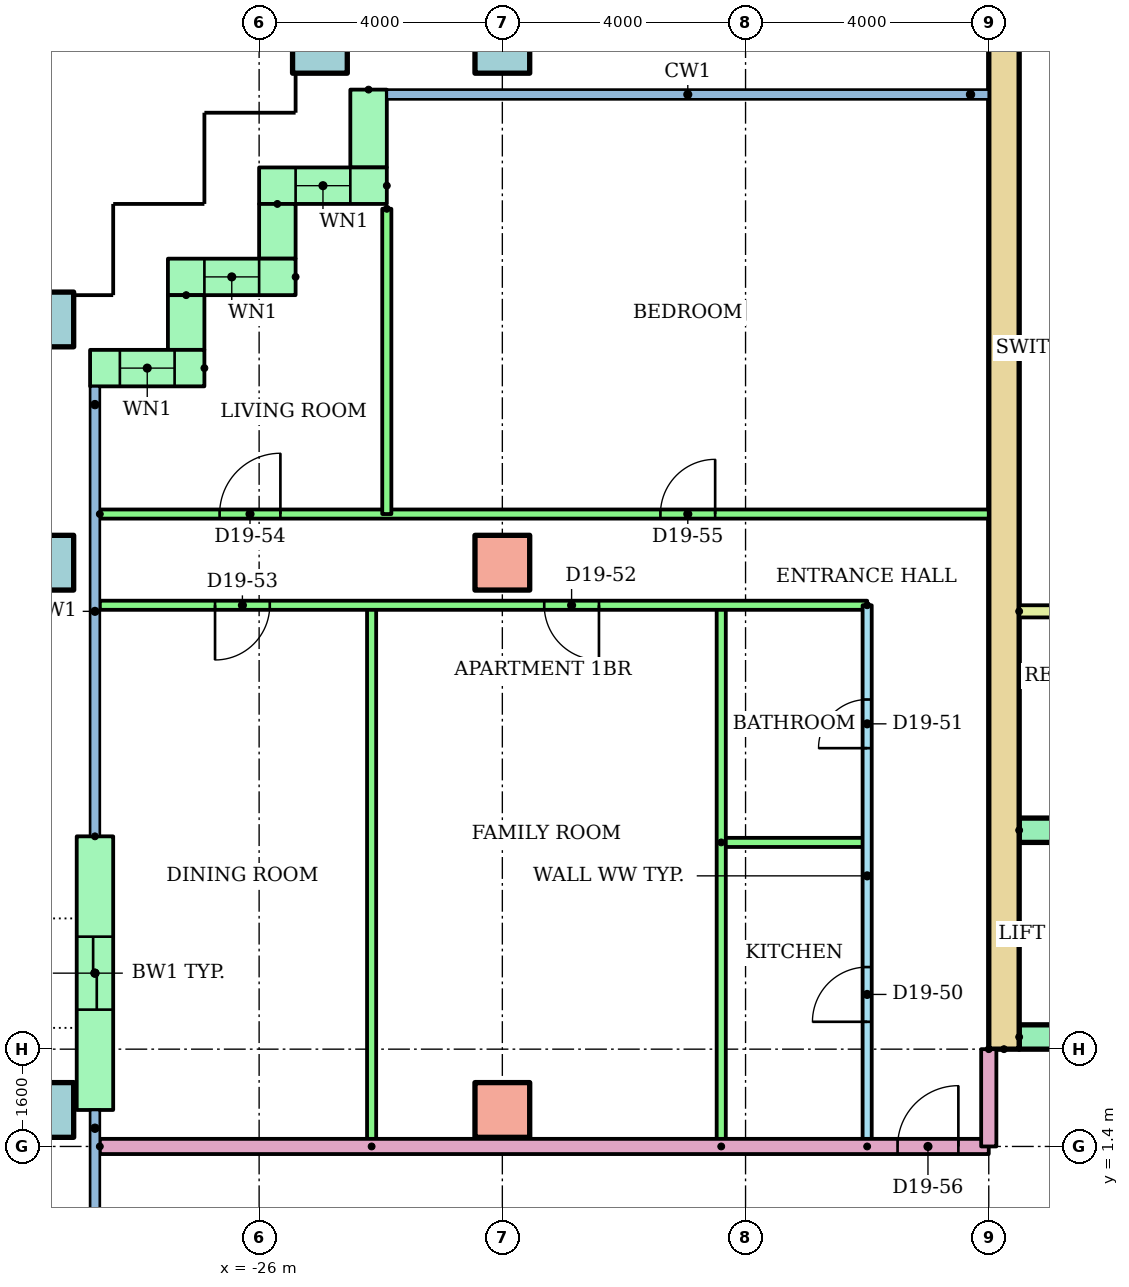
"""IFC4 building model, lengths in metres.
Left out: names, types, materials, properties, quantities, classifications, styles, units other than length and angle.
Written with IfcOpenShell. Run it as: python <this file> out.ifc"""

import sys

from ifc_helpers import new_model, si_unit, direction, frame, frame_2d, origin, origin_2d, place, context, subcontext, project, spatial, rectangle, hollow_rectangle, extrude, element, fill, save


model = new_model("IFC4")
c1 = context("Model", 3, precision=1e-05, world=origin(), true_north=direction((0.0, 1.0)))
c2 = subcontext(c1, "Body", "Model", "MODEL_VIEW")
j1 = project(units=[si_unit("LENGTHUNIT", "METRE"), si_unit("PLANEANGLEUNIT", "RADIAN")], contexts=[c1])
p1 = place(None, origin())
s1 = spatial("IfcSite", under=j1, at=p1, CompositionType="ELEMENT")
p2 = place(p1, origin())
s2 = spatial("IfcBuilding", under=s1, at=p2, CompositionType="ELEMENT")
p3 = place(p2, frame((0.0, 0.0, 77.5)))
s3 = spatial("IfcBuildingStorey", under=s2, at=p3, CompositionType="ELEMENT", Elevation=77.5)
p4 = place(p3, frame((-29.5, 2.0, 0.0)))
e1 = element("IfcColumn", 1, at=p4, inside=s3, PredefinedType="COLUMN", context=c2, shape_type="SweptSolid", body=[
    extrude(hollow_rectangle(XDim=0.9, YDim=0.9, WallThickness=0.045, at=origin_2d()), origin(), (0.0, 0.0, 1.0), 3.2),
])
p5 = place(p3, frame((-22.0, 2.0, 0.0)))
e2 = element("IfcColumn", 2, at=p5, inside=s3, PredefinedType="COLUMN", context=c2, shape_type="SweptSolid", body=[
    extrude(rectangle(XDim=0.9, YDim=0.9, at=origin_2d()), origin(), (0.0, 0.0, 1.0), 3.2),
])
p6 = place(p3, frame((-29.5, 11.0, 0.0)))
e3 = element("IfcColumn", 3, at=p6, inside=s3, PredefinedType="COLUMN", context=c2, shape_type="SweptSolid", body=[
    extrude(hollow_rectangle(XDim=0.9, YDim=0.9, WallThickness=0.045, at=origin_2d()), origin(), (0.0, 0.0, 1.0), 3.2),
])
p7 = place(p3, frame((-22.0, 11.0, 0.0)))
e4 = element("IfcColumn", 4, at=p7, inside=s3, PredefinedType="COLUMN", context=c2, shape_type="SweptSolid", body=[
    extrude(rectangle(XDim=0.9, YDim=0.9, at=origin_2d()), origin(), (0.0, 0.0, 1.0), 3.2),
])
for number, where in (
    (5, (-29.5, 15.0, 0.0)),
    (6, (-25.0, 19.5, 0.0)),
    (7, (-22.0, 19.5, 0.0)),
):
    element("IfcColumn", number, at=place(p3, frame(where)), inside=s3, PredefinedType="COLUMN", context=c2, shape_type="SweptSolid", body=[
        extrude(hollow_rectangle(XDim=0.9, YDim=0.9, WallThickness=0.045, at=origin_2d()), origin(), (0.0, 0.0, 1.0), 3.2),
    ])
p8 = place(p3, frame((-24.2, 18.78, 0.0), z_axis=(0.0, 0.0, 1.0), x_axis=(0.0, -1.0, 0.0)))
e8 = element("IfcWall", 8, at=p8, inside=s3, PredefinedType="STANDARD", context=c2, shape_type="SweptSolid", body=[
    extrude(rectangle(XDim=1.28, YDim=0.6, at=frame_2d((0.64, 0.0))), origin(), (0.0, 0.0, 1.0), 2.92),
])
p9 = place(p3, frame((-23.9, 17.2, 0.0), z_axis=(0.0, 0.0, 1.0), x_axis=(-1.0, 0.0, 0.0)))
e9 = element("IfcWall", 9, at=p9, inside=s3, PredefinedType="STANDARD", context=c2, shape_type="SweptSolid", body=[
    extrude(rectangle(XDim=2.1, YDim=0.6, at=frame_2d((1.05, 0.0))), origin(), (0.0, 0.0, 1.0), 2.92),
])
p10 = place(p9, frame((0.6, 0.0, 0.9)))
e10 = element("IfcOpeningElement", 10, at=p10, cuts=e9, PredefinedType="OPENING", context=c2, shape_type="SweptSolid", body=[
    extrude(rectangle(XDim=0.9, YDim=1.5, at=frame_2d((0.45, 0.75))), frame((0.0, 0.31, 0.0), z_axis=(0.0, -1.0, 0.0), x_axis=(1.0, 0.0, 0.0)), (0.0, 0.0, 1.0), 0.62),
])
p11 = place(p3, frame((-25.7, 16.9, 0.0), z_axis=(0.0, 0.0, 1.0), x_axis=(0.0, -1.0, 0.0)))
e11 = element("IfcWall", 11, at=p11, inside=s3, PredefinedType="STANDARD", context=c2, shape_type="SweptSolid", body=[
    extrude(rectangle(XDim=0.9, YDim=0.6, at=frame_2d((0.45, 0.0))), origin(), (0.0, 0.0, 1.0), 2.92),
])
p12 = place(p3, frame((-25.4, 15.7, 0.0), z_axis=(0.0, 0.0, 1.0), x_axis=(-1.0, 0.0, 0.0)))
e12 = element("IfcWall", 12, at=p12, inside=s3, PredefinedType="STANDARD", context=c2, shape_type="SweptSolid", body=[
    extrude(rectangle(XDim=2.1, YDim=0.6, at=frame_2d((1.05, 0.0))), origin(), (0.0, 0.0, 1.0), 2.92),
])
p13 = place(p12, frame((0.6, 0.0, 0.9)))
e13 = element("IfcOpeningElement", 13, at=p13, cuts=e12, PredefinedType="OPENING", context=c2, shape_type="SweptSolid", body=[
    extrude(rectangle(XDim=0.9, YDim=1.5, at=frame_2d((0.45, 0.75))), frame((0.0, 0.31, 0.0), z_axis=(0.0, -1.0, 0.0), x_axis=(1.0, 0.0, 0.0)), (0.0, 0.0, 1.0), 0.62),
])
p14 = place(p3, frame((-27.2, 15.4, 0.0), z_axis=(0.0, 0.0, 1.0), x_axis=(0.0, -1.0, 0.0)))
e14 = element("IfcWall", 14, at=p14, inside=s3, PredefinedType="STANDARD", context=c2, shape_type="SweptSolid", body=[
    extrude(rectangle(XDim=0.9, YDim=0.6, at=frame_2d((0.45, 0.0))), origin(), (0.0, 0.0, 1.0), 2.92),
])
p15 = place(p3, frame((-26.9, 14.2, 0.0), z_axis=(0.0, 0.0, 1.0), x_axis=(-1.0, 0.0, 0.0)))
e15 = element("IfcWall", 15, at=p15, inside=s3, PredefinedType="STANDARD", context=c2, shape_type="SweptSolid", body=[
    extrude(rectangle(XDim=1.88, YDim=0.6, at=frame_2d((0.94, 0.0))), origin(), (0.0, 0.0, 1.0), 2.92),
])
p16 = place(p15, frame((0.49, 0.0, 0.9)))
e16 = element("IfcOpeningElement", 16, at=p16, cuts=e15, PredefinedType="OPENING", context=c2, shape_type="SweptSolid", body=[
    extrude(rectangle(XDim=0.9, YDim=1.5, at=frame_2d((0.45, 0.75))), frame((0.0, 0.31, 0.0), z_axis=(0.0, -1.0, 0.0), x_axis=(1.0, 0.0, 0.0)), (0.0, 0.0, 1.0), 0.62),
])
p17 = place(p3, frame((-28.7, 6.5, 0.0), z_axis=(0.0, 0.0, 1.0), x_axis=(0.0, -1.0, 0.0)))
e17 = element("IfcWall", 17, at=p17, inside=s3, PredefinedType="STANDARD", context=c2, shape_type="SweptSolid", body=[
    extrude(rectangle(XDim=4.5, YDim=0.6, at=frame_2d((2.25, 0.0))), origin(), (0.0, 0.0, 1.0), 2.92),
])
p18 = place(p17, frame((1.65, 0.0, 0.0)))
e18 = element("IfcOpeningElement", 18, at=p18, cuts=e17, PredefinedType="OPENING", context=c2, shape_type="SweptSolid", body=[
    extrude(rectangle(XDim=1.2, YDim=2.1, at=frame_2d((0.6, 1.05))), frame((0.0, 0.31, 0.0), z_axis=(0.0, -1.0, 0.0), x_axis=(1.0, 0.0, 0.0)), (0.0, 0.0, 1.0), 0.62),
])
p19 = place(p3, frame((-13.75, 3.0, 0.0), z_axis=(0.0, 0.0, 1.0), x_axis=(0.0, 1.0, 0.0)))
e19 = element("IfcWall", 19, at=p19, inside=s3, PredefinedType="SHEAR", context=c2, shape_type="SweptSolid", body=[
    extrude(rectangle(XDim=17.0, YDim=0.5, at=frame_2d((8.5, 0.0))), origin(), (0.0, 0.0, 1.0), 2.92),
])
p20 = place(p3, frame((-13.5, 3.2, 0.0)))
e20 = element("IfcWall", 20, at=p20, inside=s3, PredefinedType="SHEAR", context=c2, shape_type="SweptSolid", body=[
    extrude(rectangle(XDim=27.0, YDim=0.4, at=frame_2d((13.5, 0.0))), origin(), (0.0, 0.0, 1.0), 2.92),
])
p21 = place(p20, frame((6.861, 0.0, 0.0)))
e21 = element("IfcOpeningElement", 21, at=p21, cuts=e20, PredefinedType="OPENING", context=c2, shape_type="SweptSolid", body=[
    extrude(rectangle(XDim=1.1, YDim=2.1, at=frame_2d((0.55, 1.05))), frame((0.0, 0.21, 0.0), z_axis=(0.0, -1.0, 0.0), x_axis=(1.0, 0.0, 0.0)), (0.0, 0.0, 1.0), 0.42),
])
p22 = place(p20, frame((9.906, 0.0, 0.0)))
e22 = element("IfcOpeningElement", 22, at=p22, cuts=e20, PredefinedType="OPENING", context=c2, shape_type="SweptSolid", body=[
    extrude(rectangle(XDim=1.1, YDim=2.1, at=frame_2d((0.55, 1.05))), frame((0.0, 0.21, 0.0), z_axis=(0.0, -1.0, 0.0), x_axis=(1.0, 0.0, 0.0)), (0.0, 0.0, 1.0), 0.42),
])
p23 = place(p20, frame((15.994, 0.0, 0.0)))
e23 = element("IfcOpeningElement", 23, at=p23, cuts=e20, PredefinedType="OPENING", context=c2, shape_type="SweptSolid", body=[
    extrude(rectangle(XDim=1.1, YDim=2.1, at=frame_2d((0.55, 1.05))), frame((0.0, 0.21, 0.0), z_axis=(0.0, -1.0, 0.0), x_axis=(1.0, 0.0, 0.0)), (0.0, 0.0, 1.0), 0.42),
])
p24 = place(p20, frame((19.039, 0.0, 0.0)))
e24 = element("IfcOpeningElement", 24, at=p24, cuts=e20, PredefinedType="OPENING", context=c2, shape_type="SweptSolid", body=[
    extrude(rectangle(XDim=1.1, YDim=2.1, at=frame_2d((0.55, 1.05))), frame((0.0, 0.21, 0.0), z_axis=(0.0, -1.0, 0.0), x_axis=(1.0, 0.0, 0.0)), (0.0, 0.0, 1.0), 0.42),
])
p25 = place(p20, frame((12.6, 0.0, 0.0)))
e25 = element("IfcOpeningElement", 25, at=p25, cuts=e20, PredefinedType="OPENING", context=c2, shape_type="SweptSolid", body=[
    extrude(rectangle(XDim=1.8, YDim=2.1, at=frame_2d((0.9, 1.05))), frame((0.0, 0.21, 0.0), z_axis=(0.0, -1.0, 0.0), x_axis=(1.0, 0.0, 0.0)), (0.0, 0.0, 1.0), 0.42),
])
p26 = place(p3, frame((-13.5, 6.6, 0.0)))
e26 = element("IfcWall", 26, at=p26, inside=s3, PredefinedType="SHEAR", context=c2, shape_type="SweptSolid", body=[
    extrude(rectangle(XDim=11.978, YDim=0.4, at=frame_2d((5.989, 0.0))), origin(), (0.0, 0.0, 1.0), 2.92),
])
p27 = place(p3, frame((-13.5, 10.2, 0.0)))
e27 = element("IfcWall", 27, at=p27, inside=s3, PredefinedType="PARTITIONING", context=c2, shape_type="SweptSolid", body=[
    extrude(rectangle(XDim=3.9, YDim=0.2, at=frame_2d((1.95, 0.0))), origin(), (0.0, 0.0, 1.0), 2.92),
])
p28 = place(p3, frame((-16.0, 1.4, 0.0), z_axis=(0.0, 0.0, 1.0), x_axis=(0.0, 1.0, 0.0)))
e28 = element("IfcWall", 28, at=p28, inside=s3, PredefinedType="PARTITIONING", context=c2, shape_type="SweptSolid", body=[
    extrude(rectangle(XDim=8.9, YDim=0.15, at=frame_2d((4.45, 0.0))), origin(), (0.0, 0.0, 1.0), 2.4),
])
p29 = place(p28, frame((2.05, 0.0, 0.0)))
e29 = element("IfcOpeningElement", 29, at=p29, cuts=e28, PredefinedType="OPENING", context=c2, shape_type="SweptSolid", body=[
    extrude(rectangle(XDim=0.9, YDim=2.1, at=frame_2d((0.45, 1.05))), frame((0.0, 0.085, 0.0), z_axis=(0.0, -1.0, 0.0), x_axis=(1.0, 0.0, 0.0)), (0.0, 0.0, 1.0), 0.17),
])
p30 = place(p28, frame((6.55, 0.0, 0.0)))
e30 = element("IfcOpeningElement", 30, at=p30, cuts=e28, PredefinedType="OPENING", context=c2, shape_type="SweptSolid", body=[
    extrude(rectangle(XDim=0.8, YDim=2.1, at=frame_2d((0.4, 1.05))), frame((0.0, 0.085, 0.0), z_axis=(0.0, -1.0, 0.0), x_axis=(1.0, 0.0, 0.0)), (0.0, 0.0, 1.0), 0.17),
])
p31 = place(p3, frame((-18.4, 6.4, 0.0)))
e31 = element("IfcWall", 31, at=p31, inside=s3, PredefinedType="PARTITIONING", context=c2, shape_type="SweptSolid", body=[
    extrude(rectangle(XDim=2.4, YDim=0.15, at=frame_2d((1.2, 0.0))), origin(), (0.0, 0.0, 1.0), 2.4),
])
for number, where, z_axis, x_axis in (
    (32, (-18.4, 1.4, 0.0), (0.0, 0.0, 1.0), (0.0, 1.0, 0.0)),
    (33, (-24.15, 1.4, 0.0), (0.0, 0.0, 1.0), (0.0, 1.0, 0.0)),
):
    element("IfcWall", number, at=place(p3, frame(where, z_axis=z_axis, x_axis=x_axis)), inside=s3, PredefinedType="PARTITIONING", context=c2, shape_type="SweptSolid", body=[
        extrude(rectangle(XDim=8.9, YDim=0.15, at=frame_2d((4.45, 0.0))), origin(), (0.0, 0.0, 1.0), 2.4),
    ])
p32 = place(p3, frame((-16.0, 10.3, 0.0), z_axis=(0.0, 0.0, 1.0), x_axis=(-1.0, 0.0, 0.0)))
e34 = element("IfcWall", 34, at=p32, inside=s3, PredefinedType="PARTITIONING", context=c2, shape_type="SweptSolid", body=[
    extrude(rectangle(XDim=12.62, YDim=0.15, at=frame_2d((6.31, 0.0))), origin(), (0.0, 0.0, 1.0), 2.4),
])
p33 = place(p32, frame((4.411, 0.0, 0.0)))
e35 = element("IfcOpeningElement", 35, at=p33, cuts=e34, PredefinedType="OPENING", context=c2, shape_type="SweptSolid", body=[
    extrude(rectangle(XDim=0.9, YDim=2.1, at=frame_2d((0.45, 1.05))), frame((0.0, 0.085, 0.0), z_axis=(0.0, -1.0, 0.0), x_axis=(1.0, 0.0, 0.0)), (0.0, 0.0, 1.0), 0.17),
])
p34 = place(p32, frame((9.825, 0.0, 0.0)))
e36 = element("IfcOpeningElement", 36, at=p34, cuts=e34, PredefinedType="OPENING", context=c2, shape_type="SweptSolid", body=[
    extrude(rectangle(XDim=0.9, YDim=2.1, at=frame_2d((0.45, 1.05))), frame((0.0, 0.085, 0.0), z_axis=(0.0, -1.0, 0.0), x_axis=(1.0, 0.0, 0.0)), (0.0, 0.0, 1.0), 0.17),
])
p35 = place(p3, frame((-28.62, 11.8, 0.0)))
e37 = element("IfcWall", 37, at=p35, inside=s3, PredefinedType="PARTITIONING", context=c2, shape_type="SweptSolid", body=[
    extrude(rectangle(XDim=14.62, YDim=0.15, at=frame_2d((7.31, 0.0))), origin(), (0.0, 0.0, 1.0), 2.4),
])
p36 = place(p35, frame((1.97, 0.0, 0.0)))
e38 = element("IfcOpeningElement", 38, at=p36, cuts=e37, PredefinedType="OPENING", context=c2, shape_type="SweptSolid", body=[
    extrude(rectangle(XDim=1.0, YDim=2.1, at=frame_2d((0.5, 1.05))), frame((0.0, 0.085, 0.0), z_axis=(0.0, -1.0, 0.0), x_axis=(1.0, 0.0, 0.0)), (0.0, 0.0, 1.0), 0.17),
])
p37 = place(p35, frame((9.22, 0.0, 0.0)))
e39 = element("IfcOpeningElement", 39, at=p37, cuts=e37, PredefinedType="OPENING", context=c2, shape_type="SweptSolid", body=[
    extrude(rectangle(XDim=0.9, YDim=2.1, at=frame_2d((0.45, 1.05))), frame((0.0, 0.085, 0.0), z_axis=(0.0, -1.0, 0.0), x_axis=(1.0, 0.0, 0.0)), (0.0, 0.0, 1.0), 0.17),
])
p38 = place(p3, frame((-23.9, 16.82, 0.0), z_axis=(0.0, 0.0, 1.0), x_axis=(0.0, -1.0, 0.0)))
e40 = element("IfcWall", 40, at=p38, inside=s3, PredefinedType="PARTITIONING", context=c2, shape_type="SweptSolid", body=[
    extrude(rectangle(XDim=5.02, YDim=0.15, at=frame_2d((2.51, 0.0))), origin(), (0.0, 0.0, 1.0), 2.4),
])
p39 = place(p3, frame((-28.62, 1.4, 0.0)))
e41 = element("IfcWall", 41, at=p39, inside=s3, PredefinedType="PARTITIONING", context=c2, shape_type="SweptSolid", body=[
    extrude(rectangle(XDim=14.62, YDim=0.25, at=frame_2d((7.31, 0.0))), origin(), (0.0, 0.0, 1.0), 2.4),
])
p40 = place(p39, frame((13.12, 0.0, 0.0)))
e42 = element("IfcOpeningElement", 42, at=p40, cuts=e41, PredefinedType="OPENING", context=c2, shape_type="SweptSolid", body=[
    extrude(rectangle(XDim=1.0, YDim=2.1, at=frame_2d((0.5, 1.05))), frame((0.0, 0.135, 0.0), z_axis=(0.0, -1.0, 0.0), x_axis=(1.0, 0.0, 0.0)), (0.0, 0.0, 1.0), 0.27),
])
p41 = place(p3, frame((-14.0, 3.0, 0.0), z_axis=(0.0, 0.0, 1.0), x_axis=(0.0, -1.0, 0.0)))
e43 = element("IfcWall", 43, at=p41, inside=s3, PredefinedType="PARTITIONING", context=c2, shape_type="SweptSolid", body=[
    extrude(rectangle(XDim=1.6, YDim=0.25, at=frame_2d((0.8, 0.0))), origin(), (0.0, 0.0, 1.0), 2.4),
])
p42 = place(p10, origin())
e44 = element("IfcWindow", 44, at=p42, inside=s3, PartitioningType="SINGLE_PANEL", PredefinedType="WINDOW", context=c2, shape_type="SweptSolid", body=[
    extrude(rectangle(XDim=0.9, YDim=1.5, at=frame_2d((0.45, 0.75))), frame((0.0, 0.03, 0.0), z_axis=(0.0, -1.0, 0.0), x_axis=(1.0, 0.0, 0.0)), (0.0, 0.0, 1.0), 0.06),
])
fill(e10, e44)
p43 = place(p13, origin())
e45 = element("IfcWindow", 45, at=p43, inside=s3, PartitioningType="SINGLE_PANEL", PredefinedType="WINDOW", context=c2, shape_type="SweptSolid", body=[
    extrude(rectangle(XDim=0.9, YDim=1.5, at=frame_2d((0.45, 0.75))), frame((0.0, 0.03, 0.0), z_axis=(0.0, -1.0, 0.0), x_axis=(1.0, 0.0, 0.0)), (0.0, 0.0, 1.0), 0.06),
])
fill(e13, e45)
p44 = place(p16, origin())
e46 = element("IfcWindow", 46, at=p44, inside=s3, PartitioningType="SINGLE_PANEL", PredefinedType="WINDOW", context=c2, shape_type="SweptSolid", body=[
    extrude(rectangle(XDim=0.9, YDim=1.5, at=frame_2d((0.45, 0.75))), frame((0.0, 0.03, 0.0), z_axis=(0.0, -1.0, 0.0), x_axis=(1.0, 0.0, 0.0)), (0.0, 0.0, 1.0), 0.06),
])
fill(e16, e46)
p45 = place(p29, origin())
e47 = element("IfcDoor", 47, at=p45, inside=s3, OperationType="SINGLE_SWING_LEFT", PredefinedType="DOOR", context=c2, shape_type="SweptSolid", body=[
    extrude(rectangle(XDim=0.9, YDim=2.1, at=frame_2d((0.45, 1.05))), frame((0.0, 0.025, 0.0), z_axis=(0.0, -1.0, 0.0), x_axis=(1.0, 0.0, 0.0)), (0.0, 0.0, 1.0), 0.05),
])
fill(e29, e47)
p46 = place(p30, origin())
e48 = element("IfcDoor", 48, at=p46, inside=s3, OperationType="SINGLE_SWING_LEFT", PredefinedType="DOOR", context=c2, shape_type="SweptSolid", body=[
    extrude(rectangle(XDim=0.8, YDim=2.1, at=frame_2d((0.4, 1.05))), frame((0.0, 0.025, 0.0), z_axis=(0.0, -1.0, 0.0), x_axis=(1.0, 0.0, 0.0)), (0.0, 0.0, 1.0), 0.05),
])
fill(e30, e48)
p47 = place(p33, origin())
e49 = element("IfcDoor", 49, at=p47, inside=s3, OperationType="SINGLE_SWING_LEFT", PredefinedType="DOOR", context=c2, shape_type="SweptSolid", body=[
    extrude(rectangle(XDim=0.9, YDim=2.1, at=frame_2d((0.45, 1.05))), frame((0.0, 0.025, 0.0), z_axis=(0.0, -1.0, 0.0), x_axis=(1.0, 0.0, 0.0)), (0.0, 0.0, 1.0), 0.05),
])
fill(e35, e49)
p48 = place(p34, origin())
e50 = element("IfcDoor", 50, at=p48, inside=s3, OperationType="SINGLE_SWING_RIGHT", PredefinedType="DOOR", context=c2, shape_type="SweptSolid", body=[
    extrude(rectangle(XDim=0.9, YDim=2.1, at=frame_2d((0.45, 1.05))), frame((0.0, 0.025, 0.0), z_axis=(0.0, -1.0, 0.0), x_axis=(1.0, 0.0, 0.0)), (0.0, 0.0, 1.0), 0.05),
])
fill(e36, e50)
p49 = place(p36, origin())
e51 = element("IfcDoor", 51, at=p49, inside=s3, OperationType="SINGLE_SWING_RIGHT", PredefinedType="DOOR", context=c2, shape_type="SweptSolid", body=[
    extrude(rectangle(XDim=1.0, YDim=2.1, at=frame_2d((0.5, 1.05))), frame((0.0, 0.025, 0.0), z_axis=(0.0, -1.0, 0.0), x_axis=(1.0, 0.0, 0.0)), (0.0, 0.0, 1.0), 0.05),
])
fill(e38, e51)
p50 = place(p37, origin())
e52 = element("IfcDoor", 52, at=p50, inside=s3, OperationType="SINGLE_SWING_RIGHT", PredefinedType="DOOR", context=c2, shape_type="SweptSolid", body=[
    extrude(rectangle(XDim=0.9, YDim=2.1, at=frame_2d((0.45, 1.05))), frame((0.0, 0.025, 0.0), z_axis=(0.0, -1.0, 0.0), x_axis=(1.0, 0.0, 0.0)), (0.0, 0.0, 1.0), 0.05),
])
fill(e39, e52)
p51 = place(p40, origin())
e53 = element("IfcDoor", 53, at=p51, inside=s3, OperationType="SINGLE_SWING_RIGHT", PredefinedType="DOOR", context=c2, shape_type="SweptSolid", body=[
    extrude(rectangle(XDim=1.0, YDim=2.1, at=frame_2d((0.5, 1.05))), frame((0.0, 0.025, 0.0), z_axis=(0.0, -1.0, 0.0), x_axis=(1.0, 0.0, 0.0)), (0.0, 0.0, 1.0), 0.05),
])
fill(e42, e53)
p52 = place(p18, origin())
e54 = element("IfcDoor", 54, at=p52, inside=s3, OperationType="SLIDING_TO_LEFT", PredefinedType="DOOR", context=c2, shape_type="SweptSolid", body=[
    extrude(rectangle(XDim=1.2, YDim=2.1, at=frame_2d((0.6, 1.05))), frame((0.0, 0.025, 0.0), z_axis=(0.0, -1.0, 0.0), x_axis=(1.0, 0.0, 0.0)), (0.0, 0.0, 1.0), 0.05),
])
fill(e18, e54)
save(model, sys.argv[1])
